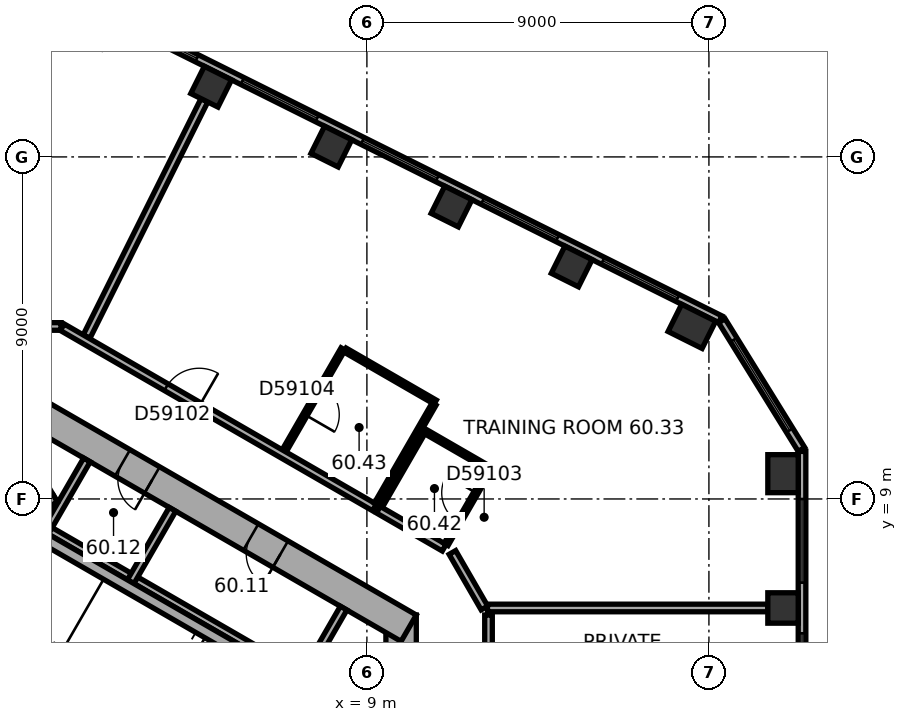
"""IFC4 building model, lengths in metres.
Left out: names, types, materials, properties, quantities, classifications, styles, units other than length and angle.
Written with IfcOpenShell. Run it as: python <this file> out.ifc"""

import sys

from ifc_helpers import new_model, si_unit, direction, frame, frame_2d, origin, origin_2d, place, context, subcontext, project, spatial, rectangle, extrude, element, fill, save


model = new_model("IFC4")
c1 = context("Model", 3, precision=1e-05, world=origin(), true_north=direction((0.0, 1.0)))
c2 = subcontext(c1, "Body", "Model", "MODEL_VIEW")
j1 = project(units=[si_unit("LENGTHUNIT", "METRE"), si_unit("PLANEANGLEUNIT", "RADIAN")], contexts=[c1])
p1 = place(None, origin())
s1 = spatial("IfcSite", under=j1, at=p1, CompositionType="ELEMENT")
p2 = place(p1, origin())
s2 = spatial("IfcBuilding", under=s1, at=p2, CompositionType="ELEMENT")
p3 = place(p2, frame((0.0, 0.0, 243.9)))
s3 = spatial("IfcBuildingStorey", under=s2, at=p3, CompositionType="ELEMENT", Elevation=243.9)
p4 = place(p3, frame((19.95, 6.132, 0.0), z_axis=(0.0, 0.0, 1.0), x_axis=(0.0, 1.0, 0.0)))
e1 = element("IfcColumn", 1, at=p4, inside=s3, PredefinedType="COLUMN", context=c2, shape_type="SweptSolid", body=[
    extrude(rectangle(XDim=0.8, YDim=0.8, at=origin_2d()), origin(), (0.0, 0.0, 1.0), 3.7),
])
for number, where, z_axis, x_axis in (
    (2, (19.95, 9.665, 0.0), (0.0, 0.0, 1.0), (0.0, 1.0, 0.0)),
    (3, (17.552, 13.541, 0.0), (0.0, 0.0, 1.0), (-0.895, 0.446, 0.0)),
):
    element("IfcColumn", number, at=place(p3, frame(where, z_axis=z_axis, x_axis=x_axis)), inside=s3, PredefinedType="COLUMN", context=c2, shape_type="SweptSolid", body=[
        extrude(rectangle(XDim=1.0, YDim=0.8, at=origin_2d()), origin(), (0.0, 0.0, 1.0), 3.7),
    ])
for number, where, z_axis, x_axis in (
    (4, (14.389, 15.118, 0.0), (0.0, 0.0, 1.0), (-0.895, 0.446, 0.0)),
    (5, (11.227, 16.695, 0.0), (0.0, 0.0, 1.0), (-0.895, 0.446, 0.0)),
    (6, (8.064, 18.271, 0.0), (0.0, 0.0, 1.0), (-0.895, 0.446, 0.0)),
    (7, (4.902, 19.848, 0.0), (0.0, 0.0, 1.0), (-0.895, 0.446, 0.0)),
):
    element("IfcColumn", number, at=place(p3, frame(where, z_axis=z_axis, x_axis=x_axis)), inside=s3, PredefinedType="COLUMN", context=c2, shape_type="SweptSolid", body=[
        extrude(rectangle(XDim=0.8, YDim=0.8, at=origin_2d()), origin(), (0.0, 0.0, 1.0), 3.7),
    ])
p5 = place(p3, frame((9.9, -5.947, 0.0), z_axis=(0.0, 0.0, 1.0), x_axis=(0.0, 1.0, 0.0)))
e8 = element("IfcWall", 8, at=p5, inside=s3, PredefinedType="SHEAR", context=c2, shape_type="SweptSolid", body=[
    extrude(rectangle(XDim=11.894, YDim=0.8, at=frame_2d((5.947, 0.0))), origin(), (0.0, 0.0, 1.0), 3.7),
])
p6 = place(p5, frame((6.147, 0.0, 0.0)))
e9 = element("IfcOpeningElement", 9, at=p6, cuts=e8, PredefinedType="OPENING", context=c2, shape_type="SweptSolid", body=[
    extrude(rectangle(XDim=1.5, YDim=2.1, at=frame_2d((0.75, 1.05))), frame((0.0, 0.41, 0.0), z_axis=(0.0, -1.0, 0.0), x_axis=(1.0, 0.0, 0.0)), (0.0, 0.0, 1.0), 0.82),
])
p7 = place(p5, frame((1.697, 0.0, 0.0)))
e10 = element("IfcOpeningElement", 10, at=p7, cuts=e8, PredefinedType="OPENING", context=c2, shape_type="SweptSolid", body=[
    extrude(rectangle(XDim=0.9, YDim=2.1, at=frame_2d((0.45, 1.05))), frame((0.0, 0.41, 0.0), z_axis=(0.0, -1.0, 0.0), x_axis=(1.0, 0.0, 0.0)), (0.0, 0.0, 1.0), 0.82),
])
p8 = place(p5, frame((4.297, 0.0, 0.0)))
e11 = element("IfcOpeningElement", 11, at=p8, cuts=e8, PredefinedType="OPENING", context=c2, shape_type="SweptSolid", body=[
    extrude(rectangle(XDim=0.9, YDim=2.1, at=frame_2d((0.45, 1.05))), frame((0.0, 0.41, 0.0), z_axis=(0.0, -1.0, 0.0), x_axis=(1.0, 0.0, 0.0)), (0.0, 0.0, 1.0), 0.82),
])
p9 = place(p3, frame((10.1, 5.6, 0.0), z_axis=(0.0, 0.0, 1.0), x_axis=(-0.866023897231, 0.500002609418, 0.0)))
e12 = element("IfcWall", 12, at=p9, inside=s3, PredefinedType="SHEAR", context=c2, shape_type="SweptSolid", body=[
    extrude(rectangle(XDim=11.894, YDim=0.8, at=frame_2d((5.947, 0.0))), origin(), (0.0, 0.0, 1.0), 3.7),
])
p10 = place(p9, frame((3.897, 0.0, 0.0)))
e13 = element("IfcOpeningElement", 13, at=p10, cuts=e12, PredefinedType="OPENING", context=c2, shape_type="SweptSolid", body=[
    extrude(rectangle(XDim=0.9, YDim=2.1, at=frame_2d((0.45, 1.05))), frame((0.0, 0.41, 0.0), z_axis=(0.0, -1.0, 0.0), x_axis=(1.0, 0.0, 0.0)), (0.0, 0.0, 1.0), 0.82),
])
p11 = place(p9, frame((7.797, 0.0, 0.0)))
e14 = element("IfcOpeningElement", 14, at=p11, cuts=e12, PredefinedType="OPENING", context=c2, shape_type="SweptSolid", body=[
    extrude(rectangle(XDim=0.9, YDim=2.1, at=frame_2d((0.45, 1.05))), frame((0.0, 0.41, 0.0), z_axis=(0.0, -1.0, 0.0), x_axis=(1.0, 0.0, 0.0)), (0.0, 0.0, 1.0), 0.82),
])
p12 = place(p3, frame((20.45, -8.59, 0.0), z_axis=(0.0, 0.0, 1.0), x_axis=(0.0, 1.0, 0.0)))
e15 = element("IfcWall", 15, at=p12, inside=s3, PredefinedType="STANDARD", context=c2, shape_type="SweptSolid", body=[
    extrude(rectangle(XDim=18.841, YDim=0.2, at=frame_2d((9.421, 0.0))), origin(), (0.0, 0.0, 1.0), 3.7),
])
p13 = place(p12, frame((1.254, 0.0, 0.9)))
e16 = element("IfcOpeningElement", 16, at=p13, cuts=e15, PredefinedType="OPENING", context=c2, shape_type="SweptSolid", body=[
    extrude(rectangle(XDim=2.2, YDim=2.0, at=frame_2d((1.1, 1.0))), frame((0.0, 0.11, 0.0), z_axis=(0.0, -1.0, 0.0), x_axis=(1.0, 0.0, 0.0)), (0.0, 0.0, 1.0), 0.22),
])
p14 = place(p12, frame((4.788, 0.0, 0.9)))
e17 = element("IfcOpeningElement", 17, at=p14, cuts=e15, PredefinedType="OPENING", context=c2, shape_type="SweptSolid", body=[
    extrude(rectangle(XDim=2.2, YDim=2.0, at=frame_2d((1.1, 1.0))), frame((0.0, 0.11, 0.0), z_axis=(0.0, -1.0, 0.0), x_axis=(1.0, 0.0, 0.0)), (0.0, 0.0, 1.0), 0.22),
])
p15 = place(p12, frame((8.322, 0.0, 0.9)))
e18 = element("IfcOpeningElement", 18, at=p15, cuts=e15, PredefinedType="OPENING", context=c2, shape_type="SweptSolid", body=[
    extrude(rectangle(XDim=2.2, YDim=2.0, at=frame_2d((1.1, 1.0))), frame((0.0, 0.11, 0.0), z_axis=(0.0, -1.0, 0.0), x_axis=(1.0, 0.0, 0.0)), (0.0, 0.0, 1.0), 0.22),
])
p16 = place(p12, frame((11.855, 0.0, 0.9)))
e19 = element("IfcOpeningElement", 19, at=p16, cuts=e15, PredefinedType="OPENING", context=c2, shape_type="SweptSolid", body=[
    extrude(rectangle(XDim=2.2, YDim=2.0, at=frame_2d((1.1, 1.0))), frame((0.0, 0.11, 0.0), z_axis=(0.0, -1.0, 0.0), x_axis=(1.0, 0.0, 0.0)), (0.0, 0.0, 1.0), 0.22),
])
p17 = place(p12, frame((15.389, 0.0, 0.9)))
e20 = element("IfcOpeningElement", 20, at=p17, cuts=e15, PredefinedType="OPENING", context=c2, shape_type="SweptSolid", body=[
    extrude(rectangle(XDim=2.2, YDim=2.0, at=frame_2d((1.1, 1.0))), frame((0.0, 0.11, 0.0), z_axis=(0.0, -1.0, 0.0), x_axis=(1.0, 0.0, 0.0)), (0.0, 0.0, 1.0), 0.22),
])
p18 = place(p3, frame((20.435, 10.304, 0.0), z_axis=(0.0, 0.0, 1.0), x_axis=(-0.526202661606, 0.850359194058, 0.0)))
e21 = element("IfcWall", 21, at=p18, inside=s3, PredefinedType="STANDARD", context=c2, shape_type="SweptSolid", body=[
    extrude(rectangle(XDim=3.983, YDim=0.2, at=frame_2d((1.991, 0.0))), origin(), (0.0, 0.0, 1.0), 3.7),
])
p19 = place(p18, frame((0.591, 0.0, 0.9)))
e22 = element("IfcOpeningElement", 22, at=p19, cuts=e21, PredefinedType="OPENING", context=c2, shape_type="SweptSolid", body=[
    extrude(rectangle(XDim=2.8, YDim=2.0, at=frame_2d((1.4, 1.0))), frame((0.0, 0.11, 0.0), z_axis=(0.0, -1.0, 0.0), x_axis=(1.0, 0.0, 0.0)), (0.0, 0.0, 1.0), 0.22),
])
p20 = place(p3, frame((18.299, 13.727, 0.0), z_axis=(0.0, 0.0, 1.0), x_axis=(-0.894934554817, 0.44619742558, 0.0)))
e23 = element("IfcWall", 23, at=p20, inside=s3, PredefinedType="STANDARD", context=c2, shape_type="SweptSolid", body=[
    extrude(rectangle(XDim=18.841, YDim=0.2, at=frame_2d((9.421, 0.0))), origin(), (0.0, 0.0, 1.0), 3.7),
])
p21 = place(p20, frame((1.253, 0.0, 0.9)))
e24 = element("IfcOpeningElement", 24, at=p21, cuts=e23, PredefinedType="OPENING", context=c2, shape_type="SweptSolid", body=[
    extrude(rectangle(XDim=2.2, YDim=2.0, at=frame_2d((1.1, 1.0))), frame((0.0, 0.11, 0.0), z_axis=(0.0, -1.0, 0.0), x_axis=(1.0, 0.0, 0.0)), (0.0, 0.0, 1.0), 0.22),
])
p22 = place(p20, frame((4.786, 0.0, 0.9)))
e25 = element("IfcOpeningElement", 25, at=p22, cuts=e23, PredefinedType="OPENING", context=c2, shape_type="SweptSolid", body=[
    extrude(rectangle(XDim=2.2, YDim=2.0, at=frame_2d((1.1, 1.0))), frame((0.0, 0.11, 0.0), z_axis=(0.0, -1.0, 0.0), x_axis=(1.0, 0.0, 0.0)), (0.0, 0.0, 1.0), 0.22),
])
p23 = place(p20, frame((8.32, 0.0, 0.9)))
e26 = element("IfcOpeningElement", 26, at=p23, cuts=e23, PredefinedType="OPENING", context=c2, shape_type="SweptSolid", body=[
    extrude(rectangle(XDim=2.2, YDim=2.0, at=frame_2d((1.1, 1.0))), frame((0.0, 0.11, 0.0), z_axis=(0.0, -1.0, 0.0), x_axis=(1.0, 0.0, 0.0)), (0.0, 0.0, 1.0), 0.22),
])
p24 = place(p20, frame((11.854, 0.0, 0.9)))
e27 = element("IfcOpeningElement", 27, at=p24, cuts=e23, PredefinedType="OPENING", context=c2, shape_type="SweptSolid", body=[
    extrude(rectangle(XDim=2.2, YDim=2.0, at=frame_2d((1.1, 1.0))), frame((0.0, 0.11, 0.0), z_axis=(0.0, -1.0, 0.0), x_axis=(1.0, 0.0, 0.0)), (0.0, 0.0, 1.0), 0.22),
])
p25 = place(p20, frame((15.387, 0.0, 0.9)))
e28 = element("IfcOpeningElement", 28, at=p25, cuts=e23, PredefinedType="OPENING", context=c2, shape_type="SweptSolid", body=[
    extrude(rectangle(XDim=2.2, YDim=2.0, at=frame_2d((1.1, 1.0))), frame((0.0, 0.11, 0.0), z_axis=(0.0, -1.0, 0.0), x_axis=(1.0, 0.0, 0.0)), (0.0, 0.0, 1.0), 0.22),
])
p26 = place(p3, frame((7.424, 4.259, 0.0), z_axis=(0.0, 0.0, 1.0), x_axis=(-0.866026010844, 0.49999894854, 0.0)))
e29 = element("IfcWall", 29, at=p26, inside=s3, PredefinedType="PARTITIONING", context=c2, shape_type="SweptSolid", body=[
    extrude(rectangle(XDim=8.0, YDim=0.2, at=frame_2d((4.0, 0.0))), origin(), (0.0, 0.0, 1.0), 3.42),
])
for number, where, z_axis, x_axis in (
    (30, (7.287, 4.222, 0.0), (0.0, 0.0, 1.0), (0.5, 0.866, 0.0)),
    (31, (2.784, 6.822, 0.0), (0.0, 0.0, 1.0), (0.5, 0.866, 0.0)),
    (32, (0.532, 8.122, 0.0), (0.0, 0.0, 1.0), (0.5, 0.866, 0.0)),
):
    element("IfcWall", number, at=place(p3, frame(where, z_axis=z_axis, x_axis=x_axis)), inside=s3, PredefinedType="PARTITIONING", context=c2, shape_type="SweptSolid", body=[
        extrude(rectangle(XDim=2.2, YDim=0.2, at=frame_2d((1.1, 0.0))), origin(), (0.0, 0.0, 1.0), 3.42),
    ])
p27 = place(p3, frame((0.803, 9.009, 0.0), z_axis=(0.0, 0.0, 1.0), x_axis=(-0.866028230842, -0.499995103361, 0.0)))
e33 = element("IfcWall", 33, at=p27, inside=s3, PredefinedType="PARTITIONING", context=c2, shape_type="SweptSolid", body=[
    extrude(rectangle(XDim=5.4, YDim=0.2, at=frame_2d((2.7, 0.0))), origin(), (0.0, 0.0, 1.0), 3.42),
])
p28 = place(p3, frame((0.767, 8.872, 0.0), z_axis=(0.0, 0.0, 1.0), x_axis=(-0.499994660107, 0.866028486751, 0.0)))
e34 = element("IfcWall", 34, at=p28, inside=s3, PredefinedType="PARTITIONING", context=c2, shape_type="SweptSolid", body=[
    extrude(rectangle(XDim=2.2, YDim=0.2, at=frame_2d((1.1, 0.0))), origin(), (0.0, 0.0, 1.0), 3.42),
])
p29 = place(p3, frame((6.303, 4.617, 0.0), z_axis=(0.0, 0.0, 1.0), x_axis=(-0.866027801685, 0.499995846692, 0.0)))
e35 = element("IfcWall", 35, at=p29, inside=s3, PredefinedType="SHEAR", context=c2, shape_type="SweptSolid", body=[
    extrude(rectangle(XDim=7.06, YDim=0.3, at=frame_2d((3.53, 0.0))), origin(), (0.0, 0.0, 1.0), 3.42),
])
p30 = place(p3, frame((0.95, 13.539, 0.0), z_axis=(0.0, 0.0, 1.0), x_axis=(-1.0, 0.0, 0.0)))
e36 = element("IfcWall", 36, at=p30, inside=s3, PredefinedType="PARTITIONING", context=c2, shape_type="SweptSolid", body=[
    extrude(rectangle(XDim=1.9, YDim=0.2, at=frame_2d((0.95, 0.0))), origin(), (0.0, 0.0, 1.0), 3.42),
])
p31 = place(p3, frame((4.723, 19.49, 0.0), z_axis=(0.0, 0.0, 1.0), x_axis=(-0.446186614574, -0.894939944898, 0.0)))
e37 = element("IfcWall", 37, at=p31, inside=s3, PredefinedType="PARTITIONING", context=c2, shape_type="SweptSolid", body=[
    extrude(rectangle(XDim=6.944, YDim=0.2, at=frame_2d((3.472, 0.0))), origin(), (0.0, 0.0, 1.0), 2.87),
])
p32 = place(p3, frame((6.823, 10.264, 0.0), z_axis=(0.0, 0.0, 1.0), x_axis=(0.49999285859, 0.86602952684, 0.0)))
e38 = element("IfcWall", 38, at=p32, inside=s3, PredefinedType="PARTITIONING", context=c2, shape_type="SweptSolid", body=[
    extrude(rectangle(XDim=3.1, YDim=0.12, at=frame_2d((1.55, 0.0))), origin(), (0.0, 0.0, 1.0), 2.87),
])
p33 = place(p32, frame((1.1, 0.0, 0.0)))
e39 = element("IfcOpeningElement", 39, at=p33, cuts=e38, PredefinedType="OPENING", context=c2, shape_type="SweptSolid", body=[
    extrude(rectangle(XDim=0.9, YDim=2.1, at=frame_2d((0.45, 1.05))), frame((0.0, 0.07, 0.0), z_axis=(0.0, -1.0, 0.0), x_axis=(1.0, 0.0, 0.0)), (0.0, 0.0, 1.0), 0.14),
])
p34 = place(p3, frame((8.425, 12.918, 0.0), z_axis=(0.0, 0.0, 1.0), x_axis=(0.866019409031, -0.500010383074, 0.0)))
e40 = element("IfcWall", 40, at=p34, inside=s3, PredefinedType="PARTITIONING", context=c2, shape_type="SweptSolid", body=[
    extrude(rectangle(XDim=2.74, YDim=0.12, at=frame_2d((1.37, 0.0))), origin(), (0.0, 0.0, 1.0), 3.42),
])
p35 = place(p3, frame((9.198, 8.777, 0.0), z_axis=(0.0, 0.0, 1.0), x_axis=(-0.866026106692, 0.499998782526, 0.0)))
e41 = element("IfcWall", 41, at=p35, inside=s3, PredefinedType="PARTITIONING", context=c2, shape_type="SweptSolid", body=[
    extrude(rectangle(XDim=9.483, YDim=0.2, at=frame_2d((4.742, 0.0))), origin(), (0.0, 0.0, 1.0), 3.42),
])
p36 = place(p35, frame((5.325, 0.0, 0.0)))
e42 = element("IfcOpeningElement", 42, at=p36, cuts=e41, PredefinedType="OPENING", context=c2, shape_type="SweptSolid", body=[
    extrude(rectangle(XDim=1.0, YDim=2.1, at=frame_2d((0.5, 1.05))), frame((0.0, 0.11, 0.0), z_axis=(0.0, -1.0, 0.0), x_axis=(1.0, 0.0, 0.0)), (0.0, 0.0, 1.0), 0.22),
])
p37 = place(p3, frame((9.351, 8.804, 0.0), z_axis=(0.0, 0.0, 1.0), x_axis=(0.500031774688, 0.866007057882, 0.0)))
e43 = element("IfcWall", 43, at=p37, inside=s3, PredefinedType="PARTITIONING", context=c2, shape_type="SweptSolid", body=[
    extrude(rectangle(XDim=2.3, YDim=0.12, at=frame_2d((1.15, 0.0))), origin(), (0.0, 0.0, 1.0), 3.42),
])
p38 = place(p3, frame((10.553, 10.766, 0.0), z_axis=(0.0, 0.0, 1.0), x_axis=(0.866011626733, -0.500023861795, 0.0)))
e44 = element("IfcWall", 44, at=p38, inside=s3, PredefinedType="PARTITIONING", context=c2, shape_type="SweptSolid", body=[
    extrude(rectangle(XDim=1.94, YDim=0.12, at=frame_2d((0.97, 0.0))), origin(), (0.0, 0.0, 1.0), 3.42),
])
p39 = place(p3, frame((10.768, 11.496, 0.0), z_axis=(0.0, 0.0, 1.0), x_axis=(-0.500026023896, -0.86601037836, 0.0)))
e45 = element("IfcWall", 45, at=p39, inside=s3, PredefinedType="PARTITIONING", context=c2, shape_type="SweptSolid", body=[
    extrude(rectangle(XDim=3.04, YDim=0.12, at=frame_2d((1.52, 0.0))), origin(), (0.0, 0.0, 1.0), 3.42),
])
p40 = place(p3, frame((11.033, 7.717, 0.0), z_axis=(0.0, 0.0, 1.0), x_axis=(-0.866010750942, 0.50002537861, 0.0)))
e46 = element("IfcWall", 46, at=p40, inside=s3, PredefinedType="PARTITIONING", context=c2, shape_type="SweptSolid", body=[
    extrude(rectangle(XDim=2.0, YDim=0.2, at=frame_2d((1.0, 0.0))), origin(), (0.0, 0.0, 1.0), 3.42),
])
p41 = place(p3, frame((12.093, 6.132, 0.0), z_axis=(0.0, 0.0, 1.0), x_axis=(-0.500031561776, 0.866007180818, 0.0)))
e47 = element("IfcWall", 47, at=p41, inside=s3, PredefinedType="PARTITIONING", context=c2, shape_type="SweptSolid", body=[
    extrude(rectangle(XDim=1.687, YDim=0.2, at=frame_2d((0.843, 0.0))), origin(), (0.0, 0.0, 1.0), 3.42),
])
p42 = place(p3, frame((12.2, 2.598, 0.0), z_axis=(0.0, 0.0, 1.0), x_axis=(0.0, 1.0, 0.0)))
e48 = element("IfcWall", 48, at=p42, inside=s3, PredefinedType="PARTITIONING", context=c2, shape_type="SweptSolid", body=[
    extrude(rectangle(XDim=3.349, YDim=0.2, at=frame_2d((1.674, 0.0))), origin(), (0.0, 0.0, 1.0), 3.42),
])
p43 = place(p3, frame((12.204, 9.744, 0.0), z_axis=(0.0, 0.0, 1.0), x_axis=(-0.500030632641, -0.866007717299, 0.0)))
e49 = element("IfcWall", 49, at=p43, inside=s3, PredefinedType="PARTITIONING", context=c2, shape_type="SweptSolid", body=[
    extrude(rectangle(XDim=2.24, YDim=0.12, at=frame_2d((1.12, 0.0))), origin(), (0.0, 0.0, 1.0), 3.42),
])
p44 = place(p43, frame((0.67, 0.0, 0.0)))
e50 = element("IfcOpeningElement", 50, at=p44, cuts=e49, PredefinedType="OPENING", context=c2, shape_type="SweptSolid", body=[
    extrude(rectangle(XDim=0.9, YDim=2.1, at=frame_2d((0.45, 1.05))), frame((0.0, 0.07, 0.0), z_axis=(0.0, -1.0, 0.0), x_axis=(1.0, 0.0, 0.0)), (0.0, 0.0, 1.0), 0.14),
])
p45 = place(p3, frame((19.55, 6.132, 0.0), z_axis=(0.0, 0.0, 1.0), x_axis=(-1.0, 0.0, 0.0)))
e51 = element("IfcWall", 51, at=p45, inside=s3, PredefinedType="PARTITIONING", context=c2, shape_type="SweptSolid", body=[
    extrude(rectangle(XDim=7.377, YDim=0.2, at=frame_2d((3.688, 0.0))), origin(), (0.0, 0.0, 1.0), 3.42),
])
p46 = place(p16, origin())
e52 = element("IfcWindow", 52, at=p46, inside=s3, PartitioningType="SINGLE_PANEL", PredefinedType="WINDOW", context=c2, shape_type="SweptSolid", body=[
    extrude(rectangle(XDim=2.2, YDim=2.0, at=frame_2d((1.1, 1.0))), frame((0.0, 0.03, 0.0), z_axis=(0.0, -1.0, 0.0), x_axis=(1.0, 0.0, 0.0)), (0.0, 0.0, 1.0), 0.06),
])
fill(e19, e52)
p47 = place(p17, origin())
e53 = element("IfcWindow", 53, at=p47, inside=s3, PartitioningType="SINGLE_PANEL", PredefinedType="WINDOW", context=c2, shape_type="SweptSolid", body=[
    extrude(rectangle(XDim=2.2, YDim=2.0, at=frame_2d((1.1, 1.0))), frame((0.0, 0.03, 0.0), z_axis=(0.0, -1.0, 0.0), x_axis=(1.0, 0.0, 0.0)), (0.0, 0.0, 1.0), 0.06),
])
fill(e20, e53)
p48 = place(p19, origin())
e54 = element("IfcWindow", 54, at=p48, inside=s3, PartitioningType="SINGLE_PANEL", PredefinedType="WINDOW", context=c2, shape_type="SweptSolid", body=[
    extrude(rectangle(XDim=2.8, YDim=2.0, at=frame_2d((1.4, 1.0))), frame((0.0, 0.03, 0.0), z_axis=(0.0, -1.0, 0.0), x_axis=(1.0, 0.0, 0.0)), (0.0, 0.0, 1.0), 0.06),
])
fill(e22, e54)
p49 = place(p21, origin())
e55 = element("IfcWindow", 55, at=p49, inside=s3, PartitioningType="SINGLE_PANEL", PredefinedType="WINDOW", context=c2, shape_type="SweptSolid", body=[
    extrude(rectangle(XDim=2.2, YDim=2.0, at=frame_2d((1.1, 1.0))), frame((0.0, 0.03, 0.0), z_axis=(0.0, -1.0, 0.0), x_axis=(1.0, 0.0, 0.0)), (0.0, 0.0, 1.0), 0.06),
])
fill(e24, e55)
p50 = place(p22, origin())
e56 = element("IfcWindow", 56, at=p50, inside=s3, PartitioningType="SINGLE_PANEL", PredefinedType="WINDOW", context=c2, shape_type="SweptSolid", body=[
    extrude(rectangle(XDim=2.2, YDim=2.0, at=frame_2d((1.1, 1.0))), frame((0.0, 0.03, 0.0), z_axis=(0.0, -1.0, 0.0), x_axis=(1.0, 0.0, 0.0)), (0.0, 0.0, 1.0), 0.06),
])
fill(e25, e56)
p51 = place(p23, origin())
e57 = element("IfcWindow", 57, at=p51, inside=s3, PartitioningType="SINGLE_PANEL", PredefinedType="WINDOW", context=c2, shape_type="SweptSolid", body=[
    extrude(rectangle(XDim=2.2, YDim=2.0, at=frame_2d((1.1, 1.0))), frame((0.0, 0.03, 0.0), z_axis=(0.0, -1.0, 0.0), x_axis=(1.0, 0.0, 0.0)), (0.0, 0.0, 1.0), 0.06),
])
fill(e26, e57)
p52 = place(p24, origin())
e58 = element("IfcWindow", 58, at=p52, inside=s3, PartitioningType="SINGLE_PANEL", PredefinedType="WINDOW", context=c2, shape_type="SweptSolid", body=[
    extrude(rectangle(XDim=2.2, YDim=2.0, at=frame_2d((1.1, 1.0))), frame((0.0, 0.03, 0.0), z_axis=(0.0, -1.0, 0.0), x_axis=(1.0, 0.0, 0.0)), (0.0, 0.0, 1.0), 0.06),
])
fill(e27, e58)
p53 = place(p25, origin())
e59 = element("IfcWindow", 59, at=p53, inside=s3, PartitioningType="SINGLE_PANEL", PredefinedType="WINDOW", context=c2, shape_type="SweptSolid", body=[
    extrude(rectangle(XDim=2.2, YDim=2.0, at=frame_2d((1.1, 1.0))), frame((0.0, 0.03, 0.0), z_axis=(0.0, -1.0, 0.0), x_axis=(1.0, 0.0, 0.0)), (0.0, 0.0, 1.0), 0.06),
])
fill(e28, e59)
p54 = place(p10, origin())
e60 = element("IfcDoor", 60, at=p54, inside=s3, OperationType="SINGLE_SWING_LEFT", PredefinedType="DOOR", context=c2, shape_type="SweptSolid", body=[
    extrude(rectangle(XDim=0.9, YDim=2.1, at=frame_2d((0.45, 1.05))), frame((0.0, 0.025, 0.0), z_axis=(0.0, -1.0, 0.0), x_axis=(1.0, 0.0, 0.0)), (0.0, 0.0, 1.0), 0.05),
])
fill(e13, e60)
p55 = place(p11, origin())
e61 = element("IfcDoor", 61, at=p55, inside=s3, OperationType="SINGLE_SWING_LEFT", PredefinedType="DOOR", context=c2, shape_type="SweptSolid", body=[
    extrude(rectangle(XDim=0.9, YDim=2.1, at=frame_2d((0.45, 1.05))), frame((0.0, 0.025, 0.0), z_axis=(0.0, -1.0, 0.0), x_axis=(1.0, 0.0, 0.0)), (0.0, 0.0, 1.0), 0.05),
])
fill(e14, e61)
p56 = place(p36, origin())
e62 = element("IfcDoor", 62, at=p56, inside=s3, OperationType="SINGLE_SWING_LEFT", PredefinedType="DOOR", context=c2, shape_type="SweptSolid", body=[
    extrude(rectangle(XDim=1.0, YDim=2.1, at=frame_2d((0.5, 1.05))), frame((0.0, 0.025, 0.0), z_axis=(0.0, -1.0, 0.0), x_axis=(1.0, 0.0, 0.0)), (0.0, 0.0, 1.0), 0.05),
])
fill(e42, e62)
p57 = place(p44, origin())
e63 = element("IfcDoor", 63, at=p57, inside=s3, OperationType="SINGLE_SWING_LEFT", PredefinedType="DOOR", context=c2, shape_type="SweptSolid", body=[
    extrude(rectangle(XDim=0.9, YDim=2.1, at=frame_2d((0.45, 1.05))), frame((0.0, 0.025, 0.0), z_axis=(0.0, -1.0, 0.0), x_axis=(1.0, 0.0, 0.0)), (0.0, 0.0, 1.0), 0.05),
])
fill(e50, e63)
p58 = place(p33, origin())
e64 = element("IfcDoor", 64, at=p58, inside=s3, OperationType="SINGLE_SWING_LEFT", PredefinedType="DOOR", context=c2, shape_type="SweptSolid", body=[
    extrude(rectangle(XDim=0.9, YDim=2.1, at=frame_2d((0.45, 1.05))), frame((0.0, 0.025, 0.0), z_axis=(0.0, -1.0, 0.0), x_axis=(1.0, 0.0, 0.0)), (0.0, 0.0, 1.0), 0.05),
])
fill(e39, e64)
save(model, sys.argv[1])
